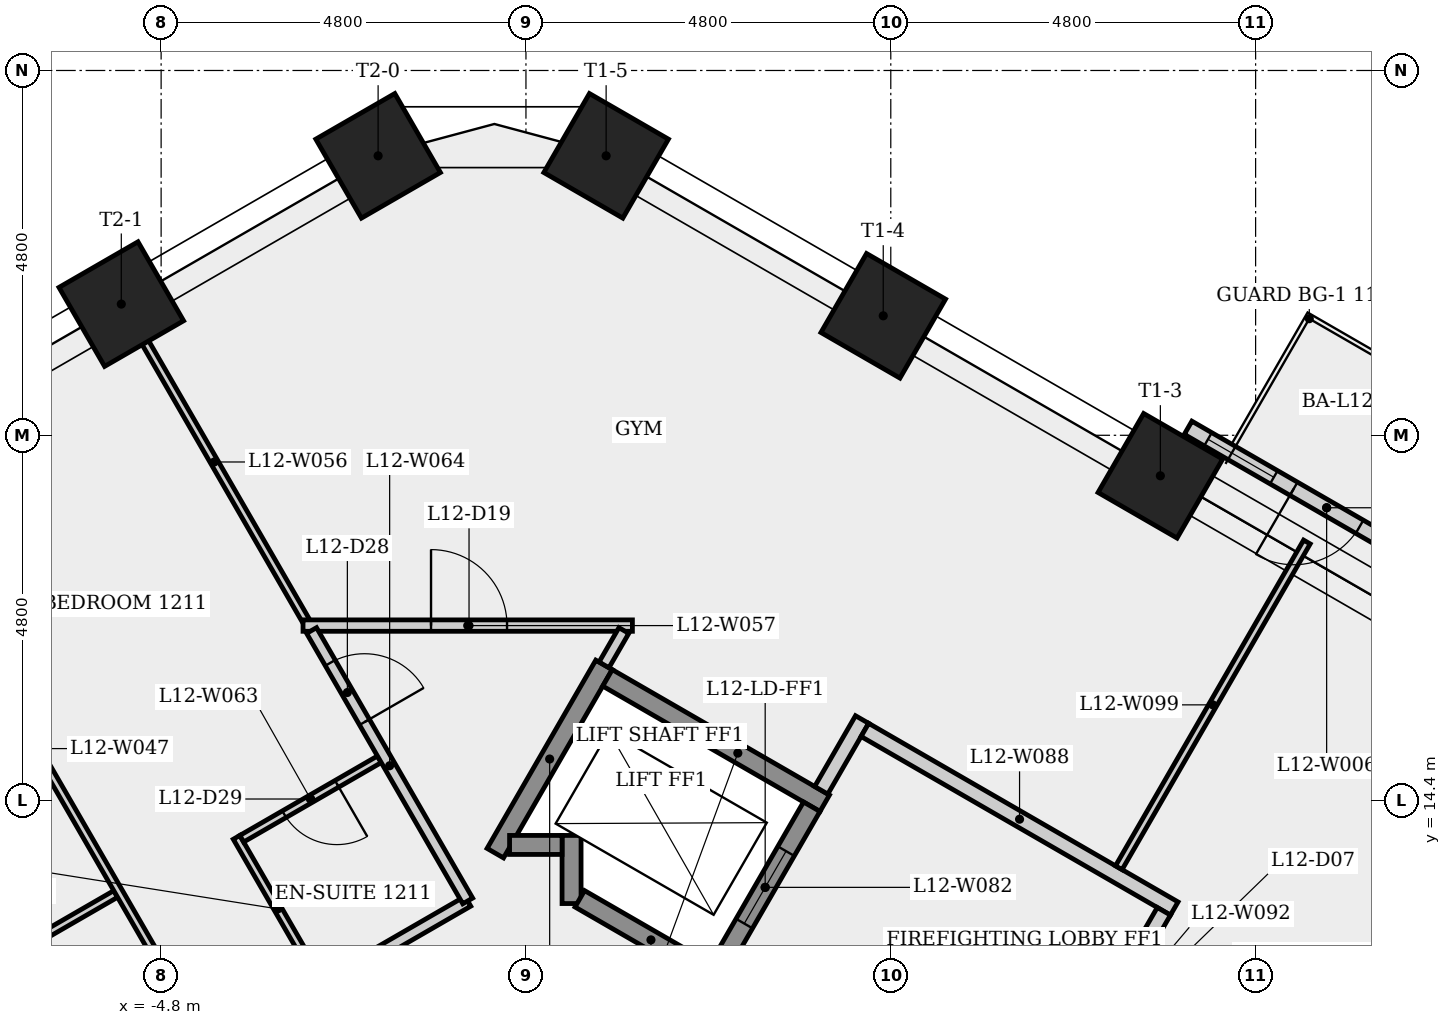
"""IFC4 building model, lengths in metres.
Left out: names, types, materials, properties, quantities, classifications, styles, units other than length and angle.
Written with IfcOpenShell. Run it as: python <this file> out.ifc"""

import sys

from ifc_helpers import new_model, si_unit, direction, frame, frame_2d, origin, origin_2d, place, context, subcontext, project, spatial, rectangle, extrude, element, fill, save


model = new_model("IFC4")
c1 = context("Model", 3, precision=1e-05, world=origin(), true_north=direction((0.0, 1.0)))
c2 = subcontext(c1, "Body", "Model", "MODEL_VIEW")
j1 = project(units=[si_unit("LENGTHUNIT", "METRE"), si_unit("PLANEANGLEUNIT", "RADIAN")], contexts=[c1])
p1 = place(None, origin())
s1 = spatial("IfcSite", under=j1, at=p1, CompositionType="ELEMENT")
p2 = place(p1, origin())
s2 = spatial("IfcBuilding", under=s1, at=p2, CompositionType="ELEMENT")
p3 = place(p2, frame((0.0, 0.0, 49.3)))
s3 = spatial("IfcBuildingStorey", under=s2, at=p3, CompositionType="ELEMENT", Elevation=49.3)
for number, where, z_axis, x_axis in (
    (1, (8.347, 18.667, 0.0), (0.0, 0.0, 1.0), (0.5, 0.866, 0.0)),
    (2, (4.701, 20.772, 0.0), (0.0, 0.0, 1.0), (0.5, 0.866, 0.0)),
    (3, (1.055, 22.877, 0.0), (0.0, 0.0, 1.0), (0.5, 0.866, 0.0)),
    (4, (-1.945, 22.877, 0.0), (0.0, 0.0, 1.0), (-0.5, 0.866, 0.0)),
    (5, (-5.324, 20.926, 0.0), (0.0, 0.0, 1.0), (-0.5, 0.866, 0.0)),
):
    element("IfcColumn", number, at=place(p3, frame(where, z_axis=z_axis, x_axis=x_axis)), inside=s3, PredefinedType="COLUMN", context=c2, shape_type="SweptSolid", body=[
        extrude(rectangle(XDim=1.2, YDim=1.2, at=origin_2d()), origin(), (0.0, 0.0, 1.0), 3.4),
    ])
p4 = place(p3, frame((12.357, 17.194, 0.0), z_axis=(0.0, 0.0, 1.0), x_axis=(-0.865989532063, 0.500062126497, 0.0)))
e6 = element("IfcWall", 6, at=p4, inside=s3, PredefinedType="SOLIDWALL", context=c2, shape_type="SweptSolid", body=[
    extrude(rectangle(XDim=4.21, YDim=0.2, at=frame_2d((2.105, 0.0))), origin(), (0.0, 0.0, 1.0), 3.4),
])
p5 = place(p4, frame((1.605, 0.0, 0.0)))
e7 = element("IfcOpeningElement", 7, at=p5, cuts=e6, PredefinedType="OPENING", context=c2, shape_type="SweptSolid", body=[
    extrude(rectangle(XDim=1.0, YDim=2.4, at=frame_2d((0.5, 1.2))), frame((0.0, 0.11, 0.0), z_axis=(0.0, -1.0, 0.0), x_axis=(1.0, 0.0, 0.0)), (0.0, 0.0, 1.0), 0.22),
])
p6 = place(p4, frame((0.302, 0.0, 0.9)))
e8 = element("IfcOpeningElement", 8, at=p6, cuts=e6, PredefinedType="OPENING", context=c2, shape_type="SweptSolid", body=[
    extrude(rectangle(XDim=1.0, YDim=1.5, at=frame_2d((0.5, 0.75))), frame((0.0, 0.11, 0.0), z_axis=(0.0, -1.0, 0.0), x_axis=(1.0, 0.0, 0.0)), (0.0, 0.0, 1.0), 0.22),
])
p7 = place(p4, frame((2.907, 0.0, 0.9)))
e9 = element("IfcOpeningElement", 9, at=p7, cuts=e6, PredefinedType="OPENING", context=c2, shape_type="SweptSolid", body=[
    extrude(rectangle(XDim=1.0, YDim=1.5, at=frame_2d((0.5, 0.75))), frame((0.0, 0.11, 0.0), z_axis=(0.0, -1.0, 0.0), x_axis=(1.0, 0.0, 0.0)), (0.0, 0.0, 1.0), 0.22),
])
p8 = place(p3, frame((-10.871, 7.233, 0.0), z_axis=(0.0, 0.0, 1.0), x_axis=(0.866013843593, 0.500020022305, 0.0)))
e10 = element("IfcWall", 10, at=p8, inside=s3, PredefinedType="PARTITIONING", context=c2, shape_type="SweptSolid", body=[
    extrude(rectangle(XDim=11.671, YDim=0.15, at=frame_2d((5.835, 0.0))), origin(), (0.0, 0.0, 1.0), 3.05),
])
p9 = place(p8, frame((4.24, 0.0, 0.0)))
e11 = element("IfcOpeningElement", 11, at=p9, cuts=e10, PredefinedType="OPENING", context=c2, shape_type="SweptSolid", body=[
    extrude(rectangle(XDim=0.9, YDim=2.1, at=frame_2d((0.45, 1.05))), frame((0.0, 0.085, 0.0), z_axis=(0.0, -1.0, 0.0), x_axis=(1.0, 0.0, 0.0)), (0.0, 0.0, 1.0), 0.17),
])
p10 = place(p3, frame((-5.398, 13.165, 0.0), z_axis=(0.0, 0.0, 1.0), x_axis=(-0.86601836006, -0.500012199891, 0.0)))
e12 = element("IfcWall", 12, at=p10, inside=s3, PredefinedType="PARTITIONING", context=c2, shape_type="SweptSolid", body=[
    extrude(rectangle(XDim=2.115, YDim=0.1, at=frame_2d((1.058, 0.0))), origin(), (0.0, 0.0, 1.0), 3.05),
])
p11 = place(p3, frame((-8.697, 18.979, 0.0), z_axis=(0.0, 0.0, 1.0), x_axis=(0.500009404554, -0.866019973994, 0.0)))
e13 = element("IfcWall", 13, at=p11, inside=s3, PredefinedType="PARTITIONING", context=c2, shape_type="SweptSolid", body=[
    extrude(rectangle(XDim=9.01, YDim=0.1, at=frame_2d((4.505, 0.0))), origin(), (0.0, 0.0, 1.0), 3.05),
])
p12 = place(p3, frame((-3.807, 13.91, 0.0), z_axis=(0.0, 0.0, 1.0), x_axis=(0.499978335414, -0.866037911478, 0.0)))
e14 = element("IfcWall", 14, at=p12, inside=s3, PredefinedType="PARTITIONING", context=c2, shape_type="SweptSolid", body=[
    extrude(rectangle(XDim=2.175, YDim=0.1, at=frame_2d((1.087, 0.0))), origin(), (0.0, 0.0, 1.0), 3.05),
])
p13 = place(p3, frame((-2.896, 16.761, 0.0), z_axis=(0.0, 0.0, 1.0), x_axis=(-0.49998398663, 0.86603464891, 0.0)))
e15 = element("IfcWall", 15, at=p13, inside=s3, PredefinedType="PARTITIONING", context=c2, shape_type="SweptSolid", body=[
    extrude(rectangle(XDim=4.822, YDim=0.1, at=frame_2d((2.411, 0.0))), origin(), (0.0, 0.0, 1.0), 3.05),
])
p14 = place(p3, frame((-2.933, 16.696, 0.0), z_axis=(0.0, 0.0, 1.0), x_axis=(1.0, 0.0, 0.0)))
e16 = element("IfcWall", 16, at=p14, inside=s3, PredefinedType="PARTITIONING", context=c2, shape_type="SweptSolid", body=[
    extrude(rectangle(XDim=4.334, YDim=0.15, at=frame_2d((2.167, 0.0))), origin(), (0.0, 0.0, 1.0), 3.05),
])
p15 = place(p14, frame((1.684, 0.0, 0.0)))
e17 = element("IfcOpeningElement", 17, at=p15, cuts=e16, PredefinedType="OPENING", context=c2, shape_type="SweptSolid", body=[
    extrude(rectangle(XDim=1.0, YDim=2.1, at=frame_2d((0.5, 1.05))), frame((0.0, 0.085, 0.0), z_axis=(0.0, -1.0, 0.0), x_axis=(1.0, 0.0, 0.0)), (0.0, 0.0, 1.0), 0.17),
])
p16 = place(p3, frame((-1.929, 14.937, 0.0), z_axis=(0.0, 0.0, 1.0), x_axis=(-0.866028046028, -0.499995423472, 0.0)))
e18 = element("IfcWall", 18, at=p16, inside=s3, PredefinedType="PARTITIONING", context=c2, shape_type="SweptSolid", body=[
    extrude(rectangle(XDim=2.09, YDim=0.1, at=frame_2d((1.045, 0.0))), origin(), (0.0, 0.0, 1.0), 3.05),
])
p17 = place(p16, frame((0.645, 0.0, 0.0)))
e19 = element("IfcOpeningElement", 19, at=p17, cuts=e18, PredefinedType="OPENING", context=c2, shape_type="SweptSolid", body=[
    extrude(rectangle(XDim=0.8, YDim=2.1, at=frame_2d((0.4, 1.05))), frame((0.0, 0.06, 0.0), z_axis=(0.0, -1.0, 0.0), x_axis=(1.0, 0.0, 0.0)), (0.0, 0.0, 1.0), 0.12),
])
p18 = place(p3, frame((-2.821, 16.631, 0.0), z_axis=(0.0, 0.0, 1.0), x_axis=(0.500031070095, -0.866007464714, 0.0)))
e20 = element("IfcWall", 20, at=p18, inside=s3, PredefinedType="PARTITIONING", context=c2, shape_type="SweptSolid", body=[
    extrude(rectangle(XDim=4.109, YDim=0.15, at=frame_2d((2.054, 0.0))), origin(), (0.0, 0.0, 1.0), 3.05),
])
p19 = place(p18, frame((0.492, 0.0, 0.0)))
e21 = element("IfcOpeningElement", 21, at=p19, cuts=e20, PredefinedType="OPENING", context=c2, shape_type="SweptSolid", body=[
    extrude(rectangle(XDim=0.9, YDim=2.1, at=frame_2d((0.45, 1.05))), frame((0.0, 0.085, 0.0), z_axis=(0.0, -1.0, 0.0), x_axis=(1.0, 0.0, 0.0)), (0.0, 0.0, 1.0), 0.17),
])
p20 = place(p3, frame((-0.403, 13.702, 0.0), z_axis=(0.0, 0.0, 1.0), x_axis=(0.499976111731, 0.866039195244, 0.0)))
e22 = element("IfcWall", 22, at=p20, inside=s3, PredefinedType="SHEAR", context=c2, shape_type="SweptSolid", body=[
    extrude(rectangle(XDim=2.861, YDim=0.25, at=frame_2d((1.43, 0.0))), origin(), (0.0, 0.0, 1.0), 3.05),
])
p21 = place(p3, frame((0.6, 13.039, 0.0), z_axis=(0.0, 0.0, 1.0), x_axis=(0.0, 1.0, 0.0)))
e23 = element("IfcWall", 23, at=p21, inside=s3, PredefinedType="SHEAR", context=c2, shape_type="SweptSolid", body=[
    extrude(rectangle(XDim=0.896, YDim=0.25, at=frame_2d((0.448, 0.0))), origin(), (0.0, 0.0, 1.0), 3.05),
])
p22 = place(p3, frame((0.475, 13.81, 0.0), z_axis=(0.0, 0.0, 1.0), x_axis=(-1.0, 0.0, 0.0)))
e24 = element("IfcWall", 24, at=p22, inside=s3, PredefinedType="SHEAR", context=c2, shape_type="SweptSolid", body=[
    extrude(rectangle(XDim=0.691, YDim=0.25, at=frame_2d((0.345, 0.0))), origin(), (0.0, 0.0, 1.0), 3.4),
])
p23 = place(p3, frame((1.073, 16.008, 0.0), z_axis=(0.0, 0.0, 1.0), x_axis=(0.866040211805, -0.499974350878, 0.0)))
e25 = element("IfcWall", 25, at=p23, inside=s3, PredefinedType="SHEAR", context=c2, shape_type="SweptSolid", body=[
    extrude(rectangle(XDim=3.3, YDim=0.25, at=frame_2d((1.65, 0.0))), origin(), (0.0, 0.0, 1.0), 3.05),
])
p24 = place(p3, frame((1.288, 16.631, 0.0), z_axis=(0.0, 0.0, 1.0), x_axis=(-0.499911367677, -0.866076569633, 0.0)))
e26 = element("IfcWall", 26, at=p24, inside=s3, PredefinedType="PARTITIONING", context=c2, shape_type="SweptSolid", body=[
    extrude(rectangle(XDim=0.522, YDim=0.15, at=frame_2d((0.261, 0.0))), origin(), (0.0, 0.0, 1.0), 3.05),
])
p25 = place(p3, frame((2.581, 12.02, 0.0), z_axis=(0.0, 0.0, 1.0), x_axis=(-0.86603892542, 0.499976579108, 0.0)))
e27 = element("IfcWall", 27, at=p25, inside=s3, PredefinedType="SHEAR", context=c2, shape_type="SweptSolid", body=[
    extrude(rectangle(XDim=2.162, YDim=0.25, at=frame_2d((1.081, 0.0))), origin(), (0.0, 0.0, 1.0), 3.05),
])
p26 = place(p3, frame((2.535, 12.191, 0.0), z_axis=(0.0, 0.0, 1.0), x_axis=(0.500061746146, 0.865989751695, 0.0)))
e28 = element("IfcWall", 28, at=p26, inside=s3, PredefinedType="SHEAR", context=c2, shape_type="SweptSolid", body=[
    extrude(rectangle(XDim=2.45, YDim=0.25, at=frame_2d((1.225, 0.0))), origin(), (0.0, 0.0, 1.0), 3.4),
])
p27 = place(p26, frame((0.675, 0.0, 0.0)))
e29 = element("IfcOpeningElement", 29, at=p27, cuts=e28, PredefinedType="OPENING", context=c2, shape_type="SweptSolid", body=[
    extrude(rectangle(XDim=1.1, YDim=2.1, at=frame_2d((0.55, 1.05))), frame((0.0, 0.135, 0.0), z_axis=(0.0, -1.0, 0.0), x_axis=(1.0, 0.0, 0.0)), (0.0, 0.0, 1.0), 0.27),
])
p28 = place(p3, frame((3.885, 14.529, 0.0), z_axis=(0.0, 0.0, 1.0), x_axis=(0.499997628298, 0.866026773083, 0.0)))
e30 = element("IfcWall", 30, at=p28, inside=s3, PredefinedType="PARTITIONING", context=c2, shape_type="SweptSolid", body=[
    extrude(rectangle(XDim=1.075, YDim=0.2, at=frame_2d((0.538, 0.0))), origin(), (0.0, 0.0, 1.0), 3.05),
])
p29 = place(p3, frame((4.459, 15.323, 0.0), z_axis=(0.0, 0.0, 1.0), x_axis=(0.866016039709, -0.500016218704, 0.0)))
e31 = element("IfcWall", 31, at=p29, inside=s3, PredefinedType="PARTITIONING", context=c2, shape_type="SweptSolid", body=[
    extrude(rectangle(XDim=4.7, YDim=0.2, at=frame_2d((2.35, 0.0))), origin(), (0.0, 0.0, 1.0), 3.05),
])
p30 = place(p3, frame((6.48, 9.624, 0.0), z_axis=(0.0, 0.0, 1.0), x_axis=(0.500017246033, 0.866015446554, 0.0)))
e32 = element("IfcWall", 32, at=p30, inside=s3, PredefinedType="SHEAR", context=c2, shape_type="SweptSolid", body=[
    extrude(rectangle(XDim=3.25, YDim=0.25, at=frame_2d((1.625, 0.0))), origin(), (0.0, 0.0, 1.0), 3.05),
])
p31 = place(p30, frame((1.125, 0.0, 0.0)))
e33 = element("IfcOpeningElement", 33, at=p31, cuts=e32, PredefinedType="OPENING", context=c2, shape_type="SweptSolid", body=[
    extrude(rectangle(XDim=1.0, YDim=2.1, at=frame_2d((0.5, 1.05))), frame((0.0, 0.135, 0.0), z_axis=(0.0, -1.0, 0.0), x_axis=(1.0, 0.0, 0.0)), (0.0, 0.0, 1.0), 0.27),
])
p32 = place(p3, frame((7.8, 13.51, 0.0), z_axis=(0.0, 0.0, 1.0), x_axis=(0.500001430823, 0.866024577697, 0.0)))
e34 = element("IfcWall", 34, at=p32, inside=s3, PredefinedType="PARTITIONING", context=c2, shape_type="SweptSolid", body=[
    extrude(rectangle(XDim=4.949, YDim=0.1, at=frame_2d((2.475, 0.0))), origin(), (0.0, 0.0, 1.0), 3.05),
])
p33 = place(p3, frame((8.393, 12.937, 0.0), z_axis=(0.0, 0.0, 1.0), x_axis=(-0.500065409566, -0.86598763626, 0.0)))
e35 = element("IfcWall", 35, at=p33, inside=s3, PredefinedType="PARTITIONING", context=c2, shape_type="SweptSolid", body=[
    extrude(rectangle(XDim=0.575, YDim=0.2, at=frame_2d((0.288, 0.0))), origin(), (0.0, 0.0, 1.0), 3.05),
])
p34 = place(p5, origin())
e36 = element("IfcDoor", 36, at=p34, inside=s3, OperationType="SINGLE_SWING_RIGHT", PredefinedType="DOOR", context=c2, shape_type="SweptSolid", body=[
    extrude(rectangle(XDim=1.0, YDim=2.4, at=frame_2d((0.5, 1.2))), frame((0.0, 0.025, 0.0), z_axis=(0.0, -1.0, 0.0), x_axis=(1.0, 0.0, 0.0)), (0.0, 0.0, 1.0), 0.05),
])
fill(e7, e36)
p35 = place(p7, origin())
e37 = element("IfcWindow", 37, at=p35, inside=s3, PartitioningType="SINGLE_PANEL", PredefinedType="WINDOW", context=c2, shape_type="SweptSolid", body=[
    extrude(rectangle(XDim=1.0, YDim=1.5, at=frame_2d((0.5, 0.75))), frame((0.0, 0.03, 0.0), z_axis=(0.0, -1.0, 0.0), x_axis=(1.0, 0.0, 0.0)), (0.0, 0.0, 1.0), 0.06),
])
fill(e9, e37)
p36 = place(p27, origin())
e38 = element("IfcDoor", 38, at=p36, inside=s3, OperationType="SLIDING_TO_LEFT", PredefinedType="DOOR", context=c2, shape_type="SweptSolid", body=[
    extrude(rectangle(XDim=1.1, YDim=2.1, at=frame_2d((0.55, 1.05))), frame((0.0, 0.025, 0.0), z_axis=(0.0, -1.0, 0.0), x_axis=(1.0, 0.0, 0.0)), (0.0, 0.0, 1.0), 0.05),
])
fill(e29, e38)
p37 = place(p15, origin())
e39 = element("IfcDoor", 39, at=p37, inside=s3, OperationType="SINGLE_SWING_LEFT", PredefinedType="DOOR", context=c2, shape_type="SweptSolid", body=[
    extrude(rectangle(XDim=1.0, YDim=2.1, at=frame_2d((0.5, 1.05))), frame((0.0, 0.025, 0.0), z_axis=(0.0, -1.0, 0.0), x_axis=(1.0, 0.0, 0.0)), (0.0, 0.0, 1.0), 0.05),
])
fill(e17, e39)
p38 = place(p19, origin())
e40 = element("IfcDoor", 40, at=p38, inside=s3, OperationType="SINGLE_SWING_RIGHT", PredefinedType="DOOR", context=c2, shape_type="SweptSolid", body=[
    extrude(rectangle(XDim=0.9, YDim=2.1, at=frame_2d((0.45, 1.05))), frame((0.0, 0.025, 0.0), z_axis=(0.0, -1.0, 0.0), x_axis=(1.0, 0.0, 0.0)), (0.0, 0.0, 1.0), 0.05),
])
fill(e21, e40)
p39 = place(p17, origin())
e41 = element("IfcDoor", 41, at=p39, inside=s3, OperationType="SINGLE_SWING_LEFT", PredefinedType="DOOR", context=c2, shape_type="SweptSolid", body=[
    extrude(rectangle(XDim=0.8, YDim=2.1, at=frame_2d((0.4, 1.05))), frame((0.0, 0.025, 0.0), z_axis=(0.0, -1.0, 0.0), x_axis=(1.0, 0.0, 0.0)), (0.0, 0.0, 1.0), 0.05),
])
fill(e19, e41)
save(model, sys.argv[1])
